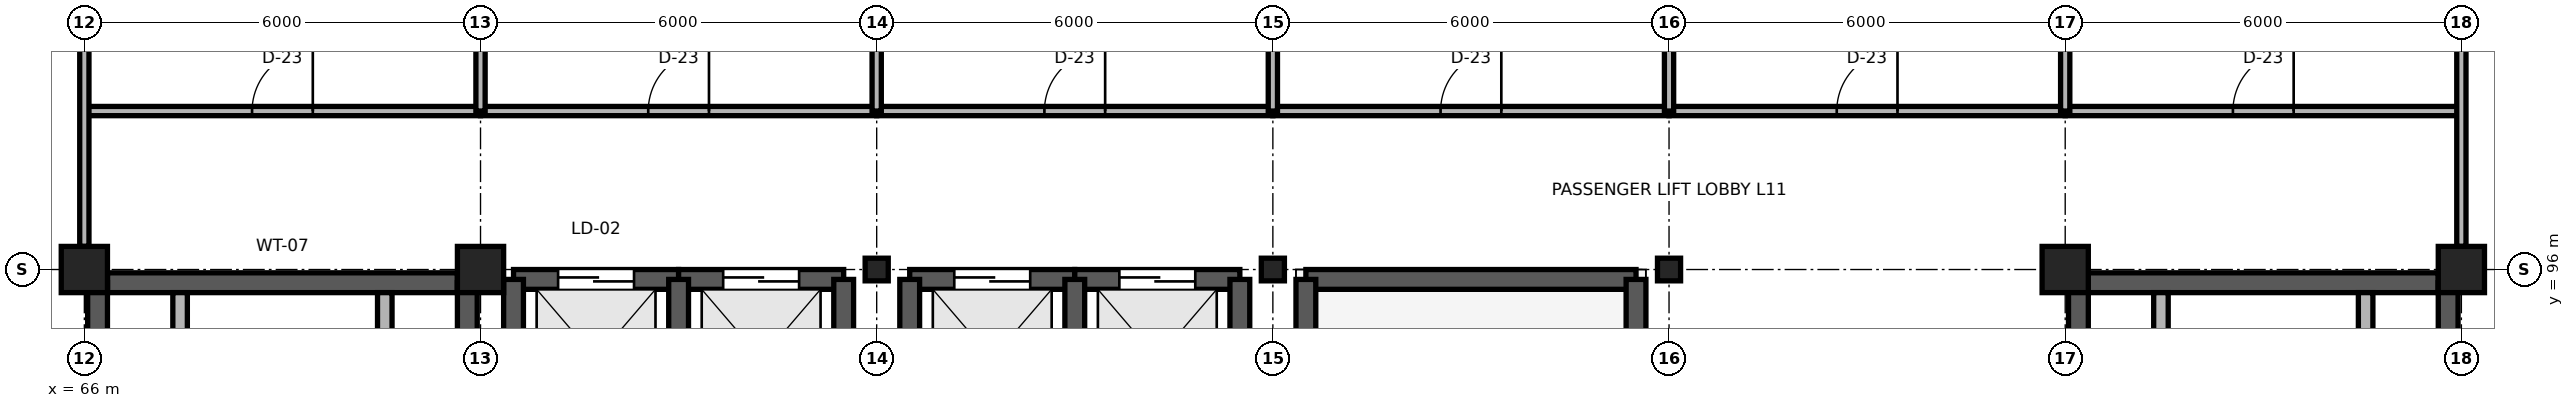
"""IFC4 building model, lengths in metres.
Left out: names, types, materials, properties, quantities, classifications, styles, units other than length and angle.
Written with IfcOpenShell. Run it as: python <this file> out.ifc"""

import sys

from ifc_helpers import new_model, si_unit, direction, frame, frame_2d, origin, origin_2d, place, context, subcontext, project, spatial, rectangle, i_section, extrude, element, fill, save


model = new_model("IFC4")
c1 = context("Model", 3, precision=1e-05, world=origin(), true_north=direction((0.0, 1.0)))
c2 = subcontext(c1, "Body", "Model", "MODEL_VIEW")
j1 = project(units=[si_unit("LENGTHUNIT", "METRE"), si_unit("PLANEANGLEUNIT", "RADIAN")], contexts=[c1])
p1 = place(None, origin())
s1 = spatial("IfcSite", under=j1, at=p1, CompositionType="ELEMENT")
p2 = place(p1, origin())
s2 = spatial("IfcBuilding", under=s1, at=p2, CompositionType="ELEMENT")
p3 = place(p2, frame((0.0, 0.0, 44.4)))
s3 = spatial("IfcBuildingStorey", under=s2, at=p3, CompositionType="ELEMENT", Elevation=44.4)
for number, where, z_axis, x_axis in (
    (1, (66.0, 96.0, 0.0), (0.0, 0.0, 1.0), (1.0, 0.0, 0.0)),
    (2, (72.0, 96.0, 0.0), (0.0, 0.0, 1.0), (1.0, 0.0, 0.0)),
):
    element("IfcColumn", number, at=place(p3, frame(where, z_axis=z_axis, x_axis=x_axis)), inside=s3, PredefinedType="COLUMN", context=c2, shape_type="SweptSolid", body=[
        extrude(rectangle(XDim=0.7, YDim=0.7, at=origin_2d()), origin(), (0.0, 0.0, 1.0), 3.9),
    ])
for number, where, z_axis, x_axis in (
    (3, (78.0, 96.0, 0.0), (0.0, 0.0, 1.0), (1.0, 0.0, 0.0)),
    (4, (84.0, 96.0, 0.0), (0.0, 0.0, 1.0), (1.0, 0.0, 0.0)),
    (5, (90.0, 96.0, 0.0), (0.0, 0.0, 1.0), (1.0, 0.0, 0.0)),
):
    element("IfcColumn", number, at=place(p3, frame(where, z_axis=z_axis, x_axis=x_axis)), inside=s3, PredefinedType="COLUMN", context=c2, shape_type="SweptSolid", body=[
        extrude(i_section(OverallWidth=0.35, OverallDepth=0.343, WebThickness=0.01, FlangeThickness=0.015, FilletRadius=0.02, at=origin_2d()), origin(), (0.0, 0.0, 1.0), 3.9),
    ])
for number, where, z_axis, x_axis in (
    (6, (96.0, 96.0, 0.0), (0.0, 0.0, 1.0), (1.0, 0.0, 0.0)),
    (7, (102.0, 96.0, 0.0), (0.0, 0.0, 1.0), (1.0, 0.0, 0.0)),
):
    element("IfcColumn", number, at=place(p3, frame(where, z_axis=z_axis, x_axis=x_axis)), inside=s3, PredefinedType="COLUMN", context=c2, shape_type="SweptSolid", body=[
        extrude(rectangle(XDim=0.7, YDim=0.7, at=origin_2d()), origin(), (0.0, 0.0, 1.0), 3.9),
    ])
p4 = place(p3, frame((66.35, 95.8, 0.0), z_axis=(0.0, 0.0, 1.0), x_axis=(1.0, 0.0, 0.0)))
e8 = element("IfcWall", 8, at=p4, inside=s3, PredefinedType="SHEAR", context=c2, shape_type="SweptSolid", body=[
    extrude(rectangle(XDim=5.3, YDim=0.3, at=frame_2d((2.65, 0.0))), origin(), (0.0, 0.0, 1.0), 3.74),
])
for number, where, z_axis, x_axis in (
    (9, (66.2, 84.0, 0.0), (0.0, 0.0, 1.0), (0.0, 1.0, 0.0)),
    (10, (71.8, 84.0, 0.0), (0.0, 0.0, 1.0), (0.0, 1.0, 0.0)),
):
    element("IfcWall", number, at=place(p3, frame(where, z_axis=z_axis, x_axis=x_axis)), inside=s3, PredefinedType="SHEAR", context=c2, shape_type="SweptSolid", body=[
        extrude(rectangle(XDim=11.8, YDim=0.3, at=frame_2d((5.9, 0.0))), origin(), (0.0, 0.0, 1.0), 3.74),
    ])
for number, where, z_axis, x_axis in (
    (11, (67.45, 94.4, 0.0), (0.0, 0.0, 1.0), (0.0, 1.0, 0.0)),
    (12, (70.55, 94.4, 0.0), (0.0, 0.0, 1.0), (0.0, 1.0, 0.0)),
):
    element("IfcWall", number, at=place(p3, frame(where, z_axis=z_axis, x_axis=x_axis)), inside=s3, PredefinedType="PARTITIONING", context=c2, shape_type="SweptSolid", body=[
        extrude(rectangle(XDim=1.25, YDim=0.22, at=frame_2d((0.625, 0.0))), origin(), (0.0, 0.0, 1.0), 3.74),
    ])
p5 = place(p3, frame((96.35, 95.8, 0.0), z_axis=(0.0, 0.0, 1.0), x_axis=(1.0, 0.0, 0.0)))
e13 = element("IfcWall", 13, at=p5, inside=s3, PredefinedType="SHEAR", context=c2, shape_type="SweptSolid", body=[
    extrude(rectangle(XDim=5.3, YDim=0.3, at=frame_2d((2.65, 0.0))), origin(), (0.0, 0.0, 1.0), 3.74),
])
for number, where, z_axis, x_axis in (
    (14, (96.2, 84.0, 0.0), (0.0, 0.0, 1.0), (0.0, 1.0, 0.0)),
    (15, (101.8, 84.0, 0.0), (0.0, 0.0, 1.0), (0.0, 1.0, 0.0)),
):
    element("IfcWall", number, at=place(p3, frame(where, z_axis=z_axis, x_axis=x_axis)), inside=s3, PredefinedType="SHEAR", context=c2, shape_type="SweptSolid", body=[
        extrude(rectangle(XDim=11.8, YDim=0.3, at=frame_2d((5.9, 0.0))), origin(), (0.0, 0.0, 1.0), 3.74),
    ])
for number, where, z_axis, x_axis in (
    (16, (97.45, 94.4, 0.0), (0.0, 0.0, 1.0), (0.0, 1.0, 0.0)),
    (17, (100.55, 94.4, 0.0), (0.0, 0.0, 1.0), (0.0, 1.0, 0.0)),
):
    element("IfcWall", number, at=place(p3, frame(where, z_axis=z_axis, x_axis=x_axis)), inside=s3, PredefinedType="PARTITIONING", context=c2, shape_type="SweptSolid", body=[
        extrude(rectangle(XDim=1.25, YDim=0.22, at=frame_2d((0.625, 0.0))), origin(), (0.0, 0.0, 1.0), 3.74),
    ])
p6 = place(p3, frame((72.5, 95.85, 0.0), z_axis=(0.0, 0.0, 1.0), x_axis=(1.0, 0.0, 0.0)))
e18 = element("IfcWall", 18, at=p6, inside=s3, PredefinedType="SHEAR", context=c2, shape_type="SweptSolid", body=[
    extrude(rectangle(XDim=2.5, YDim=0.3, at=frame_2d((1.25, 0.0))), origin(), (0.0, 0.0, 1.0), 3.74),
])
p7 = place(p6, frame((0.675, 0.0, 0.0)))
e19 = element("IfcOpeningElement", 19, at=p7, cuts=e18, PredefinedType="OPENING", context=c2, shape_type="SweptSolid", body=[
    extrude(rectangle(XDim=1.15, YDim=2.15, at=frame_2d((0.575, 1.075))), frame((0.0, 0.165, 0.0), z_axis=(0.0, -1.0, 0.0), x_axis=(1.0, 0.0, 0.0)), (0.0, 0.0, 1.0), 0.33),
])
p8 = place(p3, frame((72.5, 92.45, 0.0), z_axis=(0.0, 0.0, 1.0), x_axis=(0.0, 1.0, 0.0)))
e20 = element("IfcWall", 20, at=p8, inside=s3, PredefinedType="SHEAR", context=c2, shape_type="SweptSolid", body=[
    extrude(rectangle(XDim=3.4, YDim=0.3, at=frame_2d((1.7, 0.0))), origin(), (0.0, 0.0, 1.0), 3.74),
])
p9 = place(p3, frame((75.0, 95.85, 0.0), z_axis=(0.0, 0.0, 1.0), x_axis=(1.0, 0.0, 0.0)))
e21 = element("IfcWall", 21, at=p9, inside=s3, PredefinedType="SHEAR", context=c2, shape_type="SweptSolid", body=[
    extrude(rectangle(XDim=2.5, YDim=0.3, at=frame_2d((1.25, 0.0))), origin(), (0.0, 0.0, 1.0), 3.74),
])
p10 = place(p9, frame((0.675, 0.0, 0.0)))
e22 = element("IfcOpeningElement", 22, at=p10, cuts=e21, PredefinedType="OPENING", context=c2, shape_type="SweptSolid", body=[
    extrude(rectangle(XDim=1.15, YDim=2.15, at=frame_2d((0.575, 1.075))), frame((0.0, 0.165, 0.0), z_axis=(0.0, -1.0, 0.0), x_axis=(1.0, 0.0, 0.0)), (0.0, 0.0, 1.0), 0.33),
])
for number, where, z_axis, x_axis in (
    (23, (75.0, 92.45, 0.0), (0.0, 0.0, 1.0), (0.0, 1.0, 0.0)),
    (24, (77.5, 92.45, 0.0), (0.0, 0.0, 1.0), (0.0, 1.0, 0.0)),
):
    element("IfcWall", number, at=place(p3, frame(where, z_axis=z_axis, x_axis=x_axis)), inside=s3, PredefinedType="SHEAR", context=c2, shape_type="SweptSolid", body=[
        extrude(rectangle(XDim=3.4, YDim=0.3, at=frame_2d((1.7, 0.0))), origin(), (0.0, 0.0, 1.0), 3.74),
    ])
p11 = place(p3, frame((78.5, 95.85, 0.0), z_axis=(0.0, 0.0, 1.0), x_axis=(1.0, 0.0, 0.0)))
e25 = element("IfcWall", 25, at=p11, inside=s3, PredefinedType="SHEAR", context=c2, shape_type="SweptSolid", body=[
    extrude(rectangle(XDim=2.5, YDim=0.3, at=frame_2d((1.25, 0.0))), origin(), (0.0, 0.0, 1.0), 3.74),
])
p12 = place(p11, frame((0.675, 0.0, 0.0)))
e26 = element("IfcOpeningElement", 26, at=p12, cuts=e25, PredefinedType="OPENING", context=c2, shape_type="SweptSolid", body=[
    extrude(rectangle(XDim=1.15, YDim=2.15, at=frame_2d((0.575, 1.075))), frame((0.0, 0.165, 0.0), z_axis=(0.0, -1.0, 0.0), x_axis=(1.0, 0.0, 0.0)), (0.0, 0.0, 1.0), 0.33),
])
p13 = place(p3, frame((78.5, 92.45, 0.0), z_axis=(0.0, 0.0, 1.0), x_axis=(0.0, 1.0, 0.0)))
e27 = element("IfcWall", 27, at=p13, inside=s3, PredefinedType="SHEAR", context=c2, shape_type="SweptSolid", body=[
    extrude(rectangle(XDim=3.4, YDim=0.3, at=frame_2d((1.7, 0.0))), origin(), (0.0, 0.0, 1.0), 3.74),
])
p14 = place(p3, frame((81.0, 95.85, 0.0), z_axis=(0.0, 0.0, 1.0), x_axis=(1.0, 0.0, 0.0)))
e28 = element("IfcWall", 28, at=p14, inside=s3, PredefinedType="SHEAR", context=c2, shape_type="SweptSolid", body=[
    extrude(rectangle(XDim=2.5, YDim=0.3, at=frame_2d((1.25, 0.0))), origin(), (0.0, 0.0, 1.0), 3.74),
])
p15 = place(p14, frame((0.675, 0.0, 0.0)))
e29 = element("IfcOpeningElement", 29, at=p15, cuts=e28, PredefinedType="OPENING", context=c2, shape_type="SweptSolid", body=[
    extrude(rectangle(XDim=1.15, YDim=2.15, at=frame_2d((0.575, 1.075))), frame((0.0, 0.165, 0.0), z_axis=(0.0, -1.0, 0.0), x_axis=(1.0, 0.0, 0.0)), (0.0, 0.0, 1.0), 0.33),
])
for number, where, z_axis, x_axis in (
    (30, (81.0, 92.45, 0.0), (0.0, 0.0, 1.0), (0.0, 1.0, 0.0)),
    (31, (83.5, 92.45, 0.0), (0.0, 0.0, 1.0), (0.0, 1.0, 0.0)),
):
    element("IfcWall", number, at=place(p3, frame(where, z_axis=z_axis, x_axis=x_axis)), inside=s3, PredefinedType="SHEAR", context=c2, shape_type="SweptSolid", body=[
        extrude(rectangle(XDim=3.4, YDim=0.3, at=frame_2d((1.7, 0.0))), origin(), (0.0, 0.0, 1.0), 3.74),
    ])
p16 = place(p3, frame((84.5, 95.85, -0.16), z_axis=(0.0, 0.0, 1.0), x_axis=(1.0, 0.0, 0.0)))
e32 = element("IfcWall", 32, at=p16, inside=s3, PredefinedType="SHEAR", context=c2, shape_type="SweptSolid", body=[
    extrude(rectangle(XDim=5.0, YDim=0.3, at=frame_2d((2.5, 0.0))), origin(), (0.0, 0.0, 1.0), 0.96),
])
for number, where, z_axis, x_axis in (
    (33, (84.5, 92.45, -0.16), (0.0, 0.0, 1.0), (0.0, 1.0, 0.0)),
    (34, (89.5, 92.45, -0.16), (0.0, 0.0, 1.0), (0.0, 1.0, 0.0)),
):
    element("IfcWall", number, at=place(p3, frame(where, z_axis=z_axis, x_axis=x_axis)), inside=s3, PredefinedType="SHEAR", context=c2, shape_type="SweptSolid", body=[
        extrude(rectangle(XDim=3.4, YDim=0.3, at=frame_2d((1.7, 0.0))), origin(), (0.0, 0.0, 1.0), 0.96),
    ])
p17 = place(p3, frame((66.0, 98.4, 0.0), z_axis=(0.0, 0.0, 1.0), x_axis=(1.0, 0.0, 0.0)))
e35 = element("IfcWall", 35, at=p17, inside=s3, PredefinedType="PARTITIONING", context=c2, shape_type="SweptSolid", body=[
    extrude(rectangle(XDim=6.0, YDim=0.14, at=frame_2d((3.0, 0.0))), origin(), (0.0, 0.0, 1.0), 3.74),
])
p18 = place(p17, frame((2.54, 0.0, 0.0)))
e36 = element("IfcOpeningElement", 36, at=p18, cuts=e35, PredefinedType="OPENING", context=c2, shape_type="SweptSolid", body=[
    extrude(rectangle(XDim=0.92, YDim=2.15, at=frame_2d((0.46, 1.075))), frame((0.0, 0.085, 0.0), z_axis=(0.0, -1.0, 0.0), x_axis=(1.0, 0.0, 0.0)), (0.0, 0.0, 1.0), 0.17),
])
p19 = place(p3, frame((72.0, 98.4, 0.0), z_axis=(0.0, 0.0, 1.0), x_axis=(1.0, 0.0, 0.0)))
e37 = element("IfcWall", 37, at=p19, inside=s3, PredefinedType="PARTITIONING", context=c2, shape_type="SweptSolid", body=[
    extrude(rectangle(XDim=6.0, YDim=0.14, at=frame_2d((3.0, 0.0))), origin(), (0.0, 0.0, 1.0), 3.74),
])
p20 = place(p19, frame((2.54, 0.0, 0.0)))
e38 = element("IfcOpeningElement", 38, at=p20, cuts=e37, PredefinedType="OPENING", context=c2, shape_type="SweptSolid", body=[
    extrude(rectangle(XDim=0.92, YDim=2.15, at=frame_2d((0.46, 1.075))), frame((0.0, 0.085, 0.0), z_axis=(0.0, -1.0, 0.0), x_axis=(1.0, 0.0, 0.0)), (0.0, 0.0, 1.0), 0.17),
])
p21 = place(p3, frame((78.0, 98.4, 0.0), z_axis=(0.0, 0.0, 1.0), x_axis=(1.0, 0.0, 0.0)))
e39 = element("IfcWall", 39, at=p21, inside=s3, PredefinedType="PARTITIONING", context=c2, shape_type="SweptSolid", body=[
    extrude(rectangle(XDim=6.0, YDim=0.14, at=frame_2d((3.0, 0.0))), origin(), (0.0, 0.0, 1.0), 3.74),
])
p22 = place(p21, frame((2.54, 0.0, 0.0)))
e40 = element("IfcOpeningElement", 40, at=p22, cuts=e39, PredefinedType="OPENING", context=c2, shape_type="SweptSolid", body=[
    extrude(rectangle(XDim=0.92, YDim=2.15, at=frame_2d((0.46, 1.075))), frame((0.0, 0.085, 0.0), z_axis=(0.0, -1.0, 0.0), x_axis=(1.0, 0.0, 0.0)), (0.0, 0.0, 1.0), 0.17),
])
p23 = place(p3, frame((84.0, 98.4, 0.0), z_axis=(0.0, 0.0, 1.0), x_axis=(1.0, 0.0, 0.0)))
e41 = element("IfcWall", 41, at=p23, inside=s3, PredefinedType="PARTITIONING", context=c2, shape_type="SweptSolid", body=[
    extrude(rectangle(XDim=6.0, YDim=0.14, at=frame_2d((3.0, 0.0))), origin(), (0.0, 0.0, 1.0), 3.74),
])
p24 = place(p23, frame((2.54, 0.0, 0.0)))
e42 = element("IfcOpeningElement", 42, at=p24, cuts=e41, PredefinedType="OPENING", context=c2, shape_type="SweptSolid", body=[
    extrude(rectangle(XDim=0.92, YDim=2.15, at=frame_2d((0.46, 1.075))), frame((0.0, 0.085, 0.0), z_axis=(0.0, -1.0, 0.0), x_axis=(1.0, 0.0, 0.0)), (0.0, 0.0, 1.0), 0.17),
])
p25 = place(p3, frame((90.0, 98.4, 0.0), z_axis=(0.0, 0.0, 1.0), x_axis=(1.0, 0.0, 0.0)))
e43 = element("IfcWall", 43, at=p25, inside=s3, PredefinedType="PARTITIONING", context=c2, shape_type="SweptSolid", body=[
    extrude(rectangle(XDim=6.0, YDim=0.14, at=frame_2d((3.0, 0.0))), origin(), (0.0, 0.0, 1.0), 3.74),
])
p26 = place(p25, frame((2.54, 0.0, 0.0)))
e44 = element("IfcOpeningElement", 44, at=p26, cuts=e43, PredefinedType="OPENING", context=c2, shape_type="SweptSolid", body=[
    extrude(rectangle(XDim=0.92, YDim=2.15, at=frame_2d((0.46, 1.075))), frame((0.0, 0.085, 0.0), z_axis=(0.0, -1.0, 0.0), x_axis=(1.0, 0.0, 0.0)), (0.0, 0.0, 1.0), 0.17),
])
p27 = place(p3, frame((96.0, 98.4, 0.0), z_axis=(0.0, 0.0, 1.0), x_axis=(1.0, 0.0, 0.0)))
e45 = element("IfcWall", 45, at=p27, inside=s3, PredefinedType="PARTITIONING", context=c2, shape_type="SweptSolid", body=[
    extrude(rectangle(XDim=6.0, YDim=0.14, at=frame_2d((3.0, 0.0))), origin(), (0.0, 0.0, 1.0), 3.74),
])
p28 = place(p27, frame((2.54, 0.0, 0.0)))
e46 = element("IfcOpeningElement", 46, at=p28, cuts=e45, PredefinedType="OPENING", context=c2, shape_type="SweptSolid", body=[
    extrude(rectangle(XDim=0.92, YDim=2.15, at=frame_2d((0.46, 1.075))), frame((0.0, 0.085, 0.0), z_axis=(0.0, -1.0, 0.0), x_axis=(1.0, 0.0, 0.0)), (0.0, 0.0, 1.0), 0.17),
])
for number, where, z_axis, x_axis in (
    (47, (72.0, 98.4, 0.0), (0.0, 0.0, 1.0), (0.0, 1.0, 0.0)),
    (48, (78.0, 98.4, 0.0), (0.0, 0.0, 1.0), (0.0, 1.0, 0.0)),
    (49, (84.0, 98.4, 0.0), (0.0, 0.0, 1.0), (0.0, 1.0, 0.0)),
    (50, (90.0, 98.4, 0.0), (0.0, 0.0, 1.0), (0.0, 1.0, 0.0)),
    (51, (96.0, 98.4, 0.0), (0.0, 0.0, 1.0), (0.0, 1.0, 0.0)),
):
    element("IfcWall", number, at=place(p3, frame(where, z_axis=z_axis, x_axis=x_axis)), inside=s3, PredefinedType="PARTITIONING", context=c2, shape_type="SweptSolid", body=[
        extrude(rectangle(XDim=2.95, YDim=0.14, at=frame_2d((1.475, 0.0))), origin(), (0.0, 0.0, 1.0), 3.348),
    ])
for number, where, z_axis, x_axis in (
    (52, (66.0, 96.35, 0.0), (0.0, 0.0, 1.0), (0.0, 1.0, 0.0)),
    (53, (102.0, 96.35, 0.0), (0.0, 0.0, 1.0), (0.0, 1.0, 0.0)),
):
    element("IfcWall", number, at=place(p3, frame(where, z_axis=z_axis, x_axis=x_axis)), inside=s3, PredefinedType="PARTITIONING", context=c2, shape_type="SweptSolid", body=[
        extrude(rectangle(XDim=5.3, YDim=0.14, at=frame_2d((2.65, 0.0))), origin(), (0.0, 0.0, 1.0), 3.348),
    ])
p29 = place(p7, origin())
e54 = element("IfcDoor", 54, at=p29, inside=s3, OperationType="DOUBLE_DOOR_SLIDING", PredefinedType="DOOR", context=c2, shape_type="SweptSolid", body=[
    extrude(rectangle(XDim=1.15, YDim=2.15, at=frame_2d((0.575, 1.075))), frame((0.0, 0.025, 0.0), z_axis=(0.0, -1.0, 0.0), x_axis=(1.0, 0.0, 0.0)), (0.0, 0.0, 1.0), 0.05),
])
fill(e19, e54)
p30 = place(p10, origin())
e55 = element("IfcDoor", 55, at=p30, inside=s3, OperationType="DOUBLE_DOOR_SLIDING", PredefinedType="DOOR", context=c2, shape_type="SweptSolid", body=[
    extrude(rectangle(XDim=1.15, YDim=2.15, at=frame_2d((0.575, 1.075))), frame((0.0, 0.025, 0.0), z_axis=(0.0, -1.0, 0.0), x_axis=(1.0, 0.0, 0.0)), (0.0, 0.0, 1.0), 0.05),
])
fill(e22, e55)
p31 = place(p12, origin())
e56 = element("IfcDoor", 56, at=p31, inside=s3, OperationType="DOUBLE_DOOR_SLIDING", PredefinedType="DOOR", context=c2, shape_type="SweptSolid", body=[
    extrude(rectangle(XDim=1.15, YDim=2.15, at=frame_2d((0.575, 1.075))), frame((0.0, 0.025, 0.0), z_axis=(0.0, -1.0, 0.0), x_axis=(1.0, 0.0, 0.0)), (0.0, 0.0, 1.0), 0.05),
])
fill(e26, e56)
p32 = place(p15, origin())
e57 = element("IfcDoor", 57, at=p32, inside=s3, OperationType="DOUBLE_DOOR_SLIDING", PredefinedType="DOOR", context=c2, shape_type="SweptSolid", body=[
    extrude(rectangle(XDim=1.15, YDim=2.15, at=frame_2d((0.575, 1.075))), frame((0.0, 0.025, 0.0), z_axis=(0.0, -1.0, 0.0), x_axis=(1.0, 0.0, 0.0)), (0.0, 0.0, 1.0), 0.05),
])
fill(e29, e57)
p33 = place(p18, origin())
e58 = element("IfcDoor", 58, at=p33, inside=s3, OperationType="SINGLE_SWING_RIGHT", PredefinedType="DOOR", context=c2, shape_type="SweptSolid", body=[
    extrude(rectangle(XDim=0.92, YDim=2.15, at=frame_2d((0.46, 1.075))), frame((0.0, 0.025, 0.0), z_axis=(0.0, -1.0, 0.0), x_axis=(1.0, 0.0, 0.0)), (0.0, 0.0, 1.0), 0.05),
])
fill(e36, e58)
p34 = place(p20, origin())
e59 = element("IfcDoor", 59, at=p34, inside=s3, OperationType="SINGLE_SWING_RIGHT", PredefinedType="DOOR", context=c2, shape_type="SweptSolid", body=[
    extrude(rectangle(XDim=0.92, YDim=2.15, at=frame_2d((0.46, 1.075))), frame((0.0, 0.025, 0.0), z_axis=(0.0, -1.0, 0.0), x_axis=(1.0, 0.0, 0.0)), (0.0, 0.0, 1.0), 0.05),
])
fill(e38, e59)
p35 = place(p22, origin())
e60 = element("IfcDoor", 60, at=p35, inside=s3, OperationType="SINGLE_SWING_RIGHT", PredefinedType="DOOR", context=c2, shape_type="SweptSolid", body=[
    extrude(rectangle(XDim=0.92, YDim=2.15, at=frame_2d((0.46, 1.075))), frame((0.0, 0.025, 0.0), z_axis=(0.0, -1.0, 0.0), x_axis=(1.0, 0.0, 0.0)), (0.0, 0.0, 1.0), 0.05),
])
fill(e40, e60)
p36 = place(p24, origin())
e61 = element("IfcDoor", 61, at=p36, inside=s3, OperationType="SINGLE_SWING_RIGHT", PredefinedType="DOOR", context=c2, shape_type="SweptSolid", body=[
    extrude(rectangle(XDim=0.92, YDim=2.15, at=frame_2d((0.46, 1.075))), frame((0.0, 0.025, 0.0), z_axis=(0.0, -1.0, 0.0), x_axis=(1.0, 0.0, 0.0)), (0.0, 0.0, 1.0), 0.05),
])
fill(e42, e61)
p37 = place(p26, origin())
e62 = element("IfcDoor", 62, at=p37, inside=s3, OperationType="SINGLE_SWING_RIGHT", PredefinedType="DOOR", context=c2, shape_type="SweptSolid", body=[
    extrude(rectangle(XDim=0.92, YDim=2.15, at=frame_2d((0.46, 1.075))), frame((0.0, 0.025, 0.0), z_axis=(0.0, -1.0, 0.0), x_axis=(1.0, 0.0, 0.0)), (0.0, 0.0, 1.0), 0.05),
])
fill(e44, e62)
p38 = place(p28, origin())
e63 = element("IfcDoor", 63, at=p38, inside=s3, OperationType="SINGLE_SWING_RIGHT", PredefinedType="DOOR", context=c2, shape_type="SweptSolid", body=[
    extrude(rectangle(XDim=0.92, YDim=2.15, at=frame_2d((0.46, 1.075))), frame((0.0, 0.025, 0.0), z_axis=(0.0, -1.0, 0.0), x_axis=(1.0, 0.0, 0.0)), (0.0, 0.0, 1.0), 0.05),
])
fill(e46, e63)
save(model, sys.argv[1])
